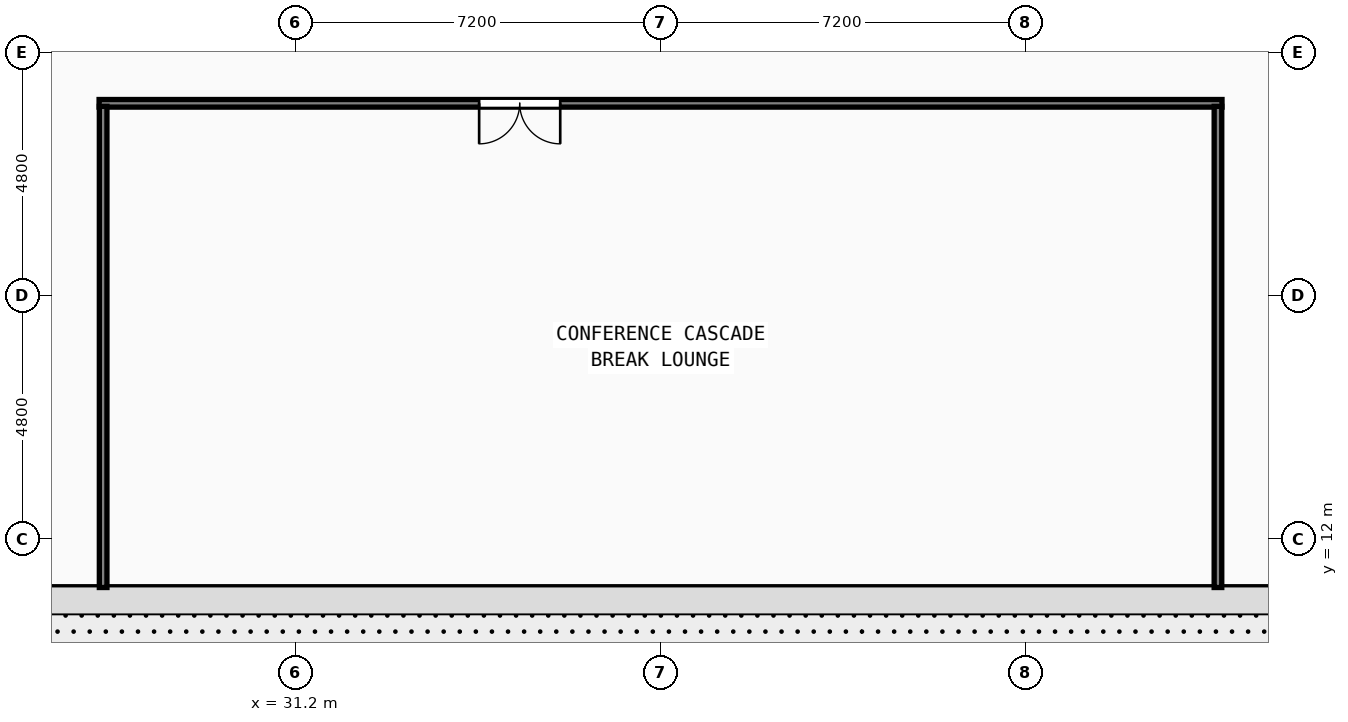
"""IFC4 building model, lengths in metres.
Left out: names, types, materials, properties, quantities, classifications, styles, units other than length and angle.
Written with IfcOpenShell. Run it as: python <this file> out.ifc"""

import sys

from ifc_helpers import new_model, si_unit, direction, frame, frame_2d, origin, origin_2d, place, context, subcontext, project, spatial, rectangle, hollow_rectangle, extrude, element, fill, save


model = new_model("IFC4")
c1 = context("Model", 3, precision=1e-05, world=origin(), true_north=direction((0.0, 1.0)))
c2 = subcontext(c1, "Body", "Model", "MODEL_VIEW")
j1 = project(units=[si_unit("LENGTHUNIT", "METRE"), si_unit("PLANEANGLEUNIT", "RADIAN")], contexts=[c1])
p1 = place(None, origin())
s1 = spatial("IfcSite", under=j1, at=p1, CompositionType="ELEMENT")
p2 = place(p1, origin())
s2 = spatial("IfcBuilding", under=s1, at=p2, CompositionType="ELEMENT")
p3 = place(p2, frame((0.0, 0.0, 15.6)))
s3 = spatial("IfcBuildingStorey", under=s2, at=p3, CompositionType="ELEMENT", Elevation=15.6)
for number, where, z_axis, x_axis in (
    (1, (31.2, 21.6, 0.0), (0.0, 0.0, 1.0), (1.0, 0.0, 0.0)),
    (2, (45.6, 21.6, 0.0), (0.0, 0.0, 1.0), (1.0, 0.0, 0.0)),
):
    element("IfcColumn", number, at=place(p3, frame(where, z_axis=z_axis, x_axis=x_axis)), inside=s3, PredefinedType="COLUMN", context=c2, shape_type="SweptSolid", body=[
        extrude(hollow_rectangle(XDim=1.3, YDim=1.3, WallThickness=0.048, at=origin_2d()), origin(), (0.0, 0.0, 1.0), 4.2),
    ])
p4 = place(p3, frame((18.004, 10.93, 0.0), z_axis=(0.0, 0.0, 1.0), x_axis=(1.0, 0.0, 0.0)))
e3 = element("IfcWall", 3, at=p4, inside=s3, PredefinedType="SOLIDWALL", context=c2, shape_type="SweptSolid", body=[
    extrude(rectangle(XDim=40.792, YDim=0.26, at=frame_2d((20.396, 0.0))), origin(), (0.0, 0.0, 1.0), 3.177),
])
p5 = place(p3, frame((27.32, 20.6, 0.0), z_axis=(0.0, 0.0, 1.0), x_axis=(1.0, 0.0, 0.0)))
e4 = element("IfcWall", 4, at=p5, inside=s3, PredefinedType="PARTITIONING", context=c2, shape_type="SweptSolid", body=[
    extrude(rectangle(XDim=22.16, YDim=0.15, at=frame_2d((11.08, 0.0))), origin(), (0.0, 0.0, 1.0), 3.78),
])
p6 = place(p5, frame((9.1, 0.0, 0.0), z_axis=(0.0, 0.0, 1.0), x_axis=(-1.0, 0.0, 0.0)))
e5 = element("IfcOpeningElement", 5, at=p6, cuts=e4, PredefinedType="OPENING", context=c2, shape_type="SweptSolid", body=[
    extrude(rectangle(XDim=1.6, YDim=2.25, at=frame_2d((0.8, 1.125))), frame((0.0, 0.085, 0.0), z_axis=(0.0, -1.0, 0.0), x_axis=(1.0, 0.0, 0.0)), (0.0, 0.0, 1.0), 0.17),
])
for number, where, z_axis, x_axis in (
    (6, (27.4, 11.045, 0.0), (0.0, 0.0, 1.0), (0.0, 1.0, 0.0)),
    (7, (49.4, 11.045, 0.0), (0.0, 0.0, 1.0), (0.0, 1.0, 0.0)),
):
    element("IfcWall", number, at=place(p3, frame(where, z_axis=z_axis, x_axis=x_axis)), inside=s3, PredefinedType="PARTITIONING", context=c2, shape_type="SweptSolid", body=[
        extrude(rectangle(XDim=9.495, YDim=0.15, at=frame_2d((4.748, 0.0))), origin(), (0.0, 0.0, 1.0), 3.78),
    ])
p7 = place(p6, origin())
e8 = element("IfcDoor", 8, at=p7, inside=s3, OperationType="DOUBLE_DOOR_SINGLE_SWING", PredefinedType="DOOR", context=c2, shape_type="SweptSolid", body=[
    extrude(rectangle(XDim=1.6, YDim=2.25, at=frame_2d((0.8, 1.125))), frame((0.0, 0.025, 0.0), z_axis=(0.0, -1.0, 0.0), x_axis=(1.0, 0.0, 0.0)), (0.0, 0.0, 1.0), 0.05),
])
fill(e5, e8)
save(model, sys.argv[1])
